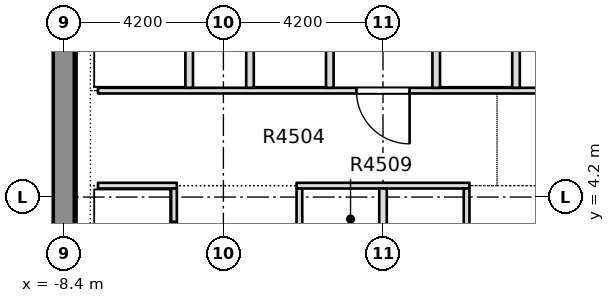
"""IFC4 building model, lengths in metres.
Left out: names, types, materials, properties, quantities, classifications, styles, units other than length and angle.
Written with IfcOpenShell. Run it as: python <this file> out.ifc"""

import sys

from ifc_helpers import new_model, si_unit, direction, frame, frame_2d, origin, place, context, subcontext, project, spatial, rectangle, extrude, element, fill, save


model = new_model("IFC4")
c1 = context("Model", 3, precision=1e-05, world=origin(), true_north=direction((0.0, 1.0)))
c2 = subcontext(c1, "Body", "Model", "MODEL_VIEW")
j1 = project(units=[si_unit("LENGTHUNIT", "METRE"), si_unit("PLANEANGLEUNIT", "RADIAN")], contexts=[c1])
p1 = place(None, origin())
s1 = spatial("IfcSite", under=j1, at=p1, CompositionType="ELEMENT")
p2 = place(p1, origin())
s2 = spatial("IfcBuilding", under=s1, at=p2, CompositionType="ELEMENT")
p3 = place(p2, frame((0.0, 0.0, 175.55)))
s3 = spatial("IfcBuildingStorey", under=s2, at=p3, CompositionType="ELEMENT", Elevation=175.55)
p4 = place(p3, frame((-8.4, -7.8, -0.4), z_axis=(0.0, 0.0, 1.0), x_axis=(0.0, 1.0, 0.0)))
e1 = element("IfcWall", 1, at=p4, inside=s3, PredefinedType="SHEAR", context=c2, shape_type="SweptSolid", body=[
    extrude(rectangle(XDim=28.95, YDim=0.6, at=frame_2d((14.475, 0.0))), origin(), (0.0, 0.0, 1.0), 3.45),
])
p5 = place(p4, frame((18.7, 0.0, 0.4)))
e2 = element("IfcOpeningElement", 2, at=p5, cuts=e1, PredefinedType="OPENING", context=c2, shape_type="SweptSolid", body=[
    extrude(rectangle(XDim=1.2, YDim=2.1, at=frame_2d((0.6, 1.05))), frame((0.0, 0.31, 0.0), z_axis=(0.0, -1.0, 0.0), x_axis=(1.0, 0.0, 0.0)), (0.0, 0.0, 1.0), 0.62),
])
p6 = place(p3, frame((-7.5, 4.5, 0.0), z_axis=(0.0, 0.0, 1.0), x_axis=(1.0, 0.0, 0.0)))
e3 = element("IfcWall", 3, at=p6, inside=s3, PredefinedType="PARTITIONING", context=c2, shape_type="SweptSolid", body=[
    extrude(rectangle(XDim=2.075, YDim=0.15, at=frame_2d((1.038, 0.0))), origin(), (0.0, 0.0, 1.0), 3.05),
])
p7 = place(p3, frame((-2.275, 4.5, 0.0), z_axis=(0.0, 0.0, 1.0), x_axis=(1.0, 0.0, 0.0)))
e4 = element("IfcWall", 4, at=p7, inside=s3, PredefinedType="PARTITIONING", context=c2, shape_type="SweptSolid", body=[
    extrude(rectangle(XDim=4.55, YDim=0.15, at=frame_2d((2.275, 0.0))), origin(), (0.0, 0.0, 1.0), 3.05),
])
p8 = place(p3, frame((-7.5, 7.0, 0.0), z_axis=(0.0, 0.0, 1.0), x_axis=(1.0, 0.0, 0.0)))
e5 = element("IfcWall", 5, at=p8, inside=s3, PredefinedType="PARTITIONING", context=c2, shape_type="SweptSolid", body=[
    extrude(rectangle(XDim=15.0, YDim=0.15, at=frame_2d((7.5, 0.0))), origin(), (0.0, 0.0, 1.0), 3.05),
])
p9 = place(p8, frame((6.8, 0.0, 0.0)))
e6 = element("IfcOpeningElement", 6, at=p9, cuts=e5, PredefinedType="OPENING", context=c2, shape_type="SweptSolid", body=[
    extrude(rectangle(XDim=1.4, YDim=2.1, at=frame_2d((0.7, 1.05))), frame((0.0, 0.085, 0.0), z_axis=(0.0, -1.0, 0.0), x_axis=(1.0, 0.0, 0.0)), (0.0, 0.0, 1.0), 0.17),
])
p10 = place(p3, frame((-5.5, -7.799, 0.0), z_axis=(0.0, 0.0, 1.0), x_axis=(0.0, 1.0, 0.0)))
e7 = element("IfcWall", 7, at=p10, inside=s3, PredefinedType="PARTITIONING", context=c2, shape_type="SweptSolid", body=[
    extrude(rectangle(XDim=12.224, YDim=0.15, at=frame_2d((6.112, 0.0))), origin(), (0.0, 0.0, 1.0), 3.05),
])
p11 = place(p10, frame((1.249, 0.0, 0.0)))
e8 = element("IfcOpeningElement", 8, at=p11, cuts=e7, PredefinedType="OPENING", context=c2, shape_type="SweptSolid", body=[
    extrude(rectangle(XDim=1.1, YDim=2.1, at=frame_2d((0.55, 1.05))), frame((0.0, 0.085, 0.0), z_axis=(0.0, -1.0, 0.0), x_axis=(1.0, 0.0, 0.0)), (0.0, 0.0, 1.0), 0.17),
])
p12 = place(p10, frame((4.249, 0.0, 0.0)))
e9 = element("IfcOpeningElement", 9, at=p12, cuts=e7, PredefinedType="OPENING", context=c2, shape_type="SweptSolid", body=[
    extrude(rectangle(XDim=1.1, YDim=2.1, at=frame_2d((0.55, 1.05))), frame((0.0, 0.085, 0.0), z_axis=(0.0, -1.0, 0.0), x_axis=(1.0, 0.0, 0.0)), (0.0, 0.0, 1.0), 0.17),
])
p13 = place(p10, frame((7.249, 0.0, 0.0)))
e10 = element("IfcOpeningElement", 10, at=p13, cuts=e7, PredefinedType="OPENING", context=c2, shape_type="SweptSolid", body=[
    extrude(rectangle(XDim=1.1, YDim=2.1, at=frame_2d((0.55, 1.05))), frame((0.0, 0.085, 0.0), z_axis=(0.0, -1.0, 0.0), x_axis=(1.0, 0.0, 0.0)), (0.0, 0.0, 1.0), 0.17),
])
p14 = place(p10, frame((10.249, 0.0, 0.0)))
e11 = element("IfcOpeningElement", 11, at=p14, cuts=e7, PredefinedType="OPENING", context=c2, shape_type="SweptSolid", body=[
    extrude(rectangle(XDim=1.1, YDim=2.1, at=frame_2d((0.55, 1.05))), frame((0.0, 0.085, 0.0), z_axis=(0.0, -1.0, 0.0), x_axis=(1.0, 0.0, 0.0)), (0.0, 0.0, 1.0), 0.17),
])
p15 = place(p3, frame((-5.1, 7.075, 0.0), z_axis=(0.0, 0.0, 1.0), x_axis=(0.0, 1.0, 0.0)))
e12 = element("IfcWall", 12, at=p15, inside=s3, PredefinedType="PARTITIONING", context=c2, shape_type="SweptSolid", body=[
    extrude(rectangle(XDim=2.725, YDim=0.2, at=frame_2d((1.363, 0.0))), origin(), (0.0, 0.0, 1.0), 3.05),
])
p16 = place(p3, frame((-3.5, 7.075, 0.0), z_axis=(0.0, 0.0, 1.0), x_axis=(0.0, 1.0, 0.0)))
e13 = element("IfcWall", 13, at=p16, inside=s3, PredefinedType="PARTITIONING", context=c2, shape_type="SweptSolid", body=[
    extrude(rectangle(XDim=2.85, YDim=0.2, at=frame_2d((1.425, 0.0))), origin(), (0.0, 0.0, 1.0), 3.05),
])
p17 = place(p3, frame((-2.2, -7.799, 0.0), z_axis=(0.0, 0.0, 1.0), x_axis=(0.0, 1.0, 0.0)))
e14 = element("IfcWall", 14, at=p17, inside=s3, PredefinedType="PARTITIONING", context=c2, shape_type="SweptSolid", body=[
    extrude(rectangle(XDim=12.224, YDim=0.15, at=frame_2d((6.112, 0.0))), origin(), (0.0, 0.0, 1.0), 3.05),
])
p18 = place(p17, frame((1.249, 0.0, 0.0)))
e15 = element("IfcOpeningElement", 15, at=p18, cuts=e14, PredefinedType="OPENING", context=c2, shape_type="SweptSolid", body=[
    extrude(rectangle(XDim=1.1, YDim=2.1, at=frame_2d((0.55, 1.05))), frame((0.0, 0.085, 0.0), z_axis=(0.0, -1.0, 0.0), x_axis=(1.0, 0.0, 0.0)), (0.0, 0.0, 1.0), 0.17),
])
p19 = place(p17, frame((5.074, 0.0, 0.0)))
e16 = element("IfcOpeningElement", 16, at=p19, cuts=e14, PredefinedType="OPENING", context=c2, shape_type="SweptSolid", body=[
    extrude(rectangle(XDim=0.95, YDim=2.1, at=frame_2d((0.475, 1.05))), frame((0.0, 0.085, 0.0), z_axis=(0.0, -1.0, 0.0), x_axis=(1.0, 0.0, 0.0)), (0.0, 0.0, 1.0), 0.17),
])
p20 = place(p17, frame((9.574, 0.0, 0.0)))
e17 = element("IfcOpeningElement", 17, at=p20, cuts=e14, PredefinedType="OPENING", context=c2, shape_type="SweptSolid", body=[
    extrude(rectangle(XDim=0.95, YDim=2.1, at=frame_2d((0.475, 1.05))), frame((0.0, 0.085, 0.0), z_axis=(0.0, -1.0, 0.0), x_axis=(1.0, 0.0, 0.0)), (0.0, 0.0, 1.0), 0.17),
])
p21 = place(p3, frame((-1.4, 7.075, 0.0), z_axis=(0.0, 0.0, 1.0), x_axis=(0.0, 1.0, 0.0)))
e18 = element("IfcWall", 18, at=p21, inside=s3, PredefinedType="PARTITIONING", context=c2, shape_type="SweptSolid", body=[
    extrude(rectangle(XDim=2.85, YDim=0.2, at=frame_2d((1.425, 0.0))), origin(), (0.0, 0.0, 1.0), 3.05),
])
p22 = place(p3, frame((0.0, -7.799, 0.0), z_axis=(0.0, 0.0, 1.0), x_axis=(0.0, 1.0, 0.0)))
e19 = element("IfcWall", 19, at=p22, inside=s3, PredefinedType="PARTITIONING", context=c2, shape_type="SweptSolid", body=[
    extrude(rectangle(XDim=12.224, YDim=0.2, at=frame_2d((6.112, 0.0))), origin(), (0.0, 0.0, 1.0), 3.05),
])
p23 = place(p3, frame((1.4, 7.075, 0.0), z_axis=(0.0, 0.0, 1.0), x_axis=(0.0, 1.0, 0.0)))
e20 = element("IfcWall", 20, at=p23, inside=s3, PredefinedType="PARTITIONING", context=c2, shape_type="SweptSolid", body=[
    extrude(rectangle(XDim=2.85, YDim=0.2, at=frame_2d((1.425, 0.0))), origin(), (0.0, 0.0, 1.0), 3.05),
])
p24 = place(p3, frame((2.2, -7.799, 0.0), z_axis=(0.0, 0.0, 1.0), x_axis=(0.0, 1.0, 0.0)))
e21 = element("IfcWall", 21, at=p24, inside=s3, PredefinedType="PARTITIONING", context=c2, shape_type="SweptSolid", body=[
    extrude(rectangle(XDim=12.224, YDim=0.15, at=frame_2d((6.112, 0.0))), origin(), (0.0, 0.0, 1.0), 3.05),
])
p25 = place(p24, frame((5.824, 0.0, 0.0)))
e22 = element("IfcOpeningElement", 22, at=p25, cuts=e21, PredefinedType="OPENING", context=c2, shape_type="SweptSolid", body=[
    extrude(rectangle(XDim=0.95, YDim=2.1, at=frame_2d((0.475, 1.05))), frame((0.0, 0.085, 0.0), z_axis=(0.0, -1.0, 0.0), x_axis=(1.0, 0.0, 0.0)), (0.0, 0.0, 1.0), 0.17),
])
p26 = place(p3, frame((3.5, 7.075, 0.0), z_axis=(0.0, 0.0, 1.0), x_axis=(0.0, 1.0, 0.0)))
e23 = element("IfcWall", 23, at=p26, inside=s3, PredefinedType="PARTITIONING", context=c2, shape_type="SweptSolid", body=[
    extrude(rectangle(XDim=2.85, YDim=0.2, at=frame_2d((1.425, 0.0))), origin(), (0.0, 0.0, 1.0), 3.05),
])
p27 = place(p14, origin())
e24 = element("IfcDoor", 24, at=p27, inside=s3, OperationType="SLIDING_TO_LEFT", PredefinedType="DOOR", context=c2, shape_type="SweptSolid", body=[
    extrude(rectangle(XDim=1.1, YDim=2.1, at=frame_2d((0.55, 1.05))), frame((0.0, 0.025, 0.0), z_axis=(0.0, -1.0, 0.0), x_axis=(1.0, 0.0, 0.0)), (0.0, 0.0, 1.0), 0.05),
])
fill(e11, e24)
p28 = place(p9, origin())
e25 = element("IfcDoor", 25, at=p28, inside=s3, OperationType="SINGLE_SWING_RIGHT", PredefinedType="DOOR", context=c2, shape_type="SweptSolid", body=[
    extrude(rectangle(XDim=1.4, YDim=2.1, at=frame_2d((0.7, 1.05))), frame((0.0, 0.025, 0.0), z_axis=(0.0, -1.0, 0.0), x_axis=(1.0, 0.0, 0.0)), (0.0, 0.0, 1.0), 0.05),
])
fill(e6, e25)
save(model, sys.argv[1])
